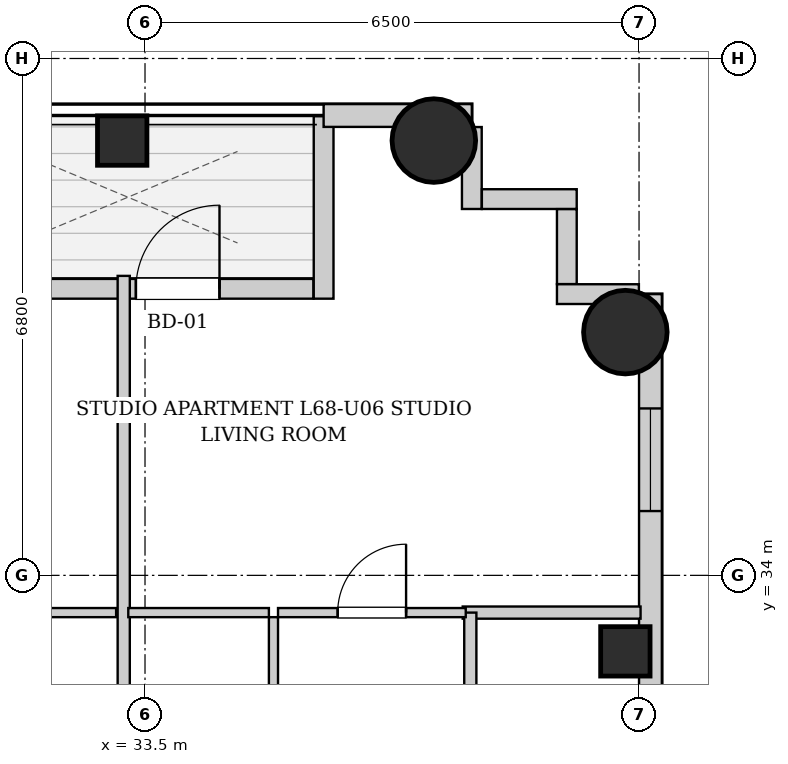
"""IFC4 building model, lengths in metres.
Left out: names, types, materials, properties, quantities, classifications, styles, units other than length and angle.
Written with IfcOpenShell. Run it as: python <this file> out.ifc"""

import sys

from ifc_helpers import new_model, si_unit, direction, frame, frame_2d, origin, origin_2d, place, context, subcontext, project, spatial, rectangle, circle, extrude, element, fill, save


model = new_model("IFC4")
c1 = context("Model", 3, precision=1e-05, world=origin(), true_north=direction((0.0, 1.0)))
c2 = subcontext(c1, "Body", "Model", "MODEL_VIEW")
j1 = project(units=[si_unit("LENGTHUNIT", "METRE"), si_unit("PLANEANGLEUNIT", "RADIAN")], contexts=[c1])
p1 = place(None, origin())
s1 = spatial("IfcSite", under=j1, at=p1, CompositionType="ELEMENT")
p2 = place(p1, origin())
s2 = spatial("IfcBuilding", under=s1, at=p2, CompositionType="ELEMENT")
p3 = place(p2, frame((0.0, 0.0, 234.3)))
s3 = spatial("IfcBuildingStorey", under=s2, at=p3, CompositionType="ELEMENT", Elevation=234.3)
p4 = place(p3, frame((33.2, 39.72, 0.0), z_axis=(0.0, 0.0, 1.0), x_axis=(1.0, 0.0, 0.0)))
e1 = element("IfcColumn", 1, at=p4, inside=s3, PredefinedType="COLUMN", context=c2, shape_type="SweptSolid", body=[
    extrude(rectangle(XDim=0.65, YDim=0.65, at=origin_2d()), origin(), (0.0, 0.0, 1.0), 3.4),
])
p5 = place(p3, frame((37.3, 39.72, 0.0), z_axis=(0.0, 0.0, 1.0), x_axis=(1.0, 0.0, 0.0)))
e2 = element("IfcColumn", 2, at=p5, inside=s3, PredefinedType="COLUMN", context=c2, shape_type="SweptSolid", body=[
    extrude(circle(Radius=0.55, at=origin_2d()), origin(), (0.0, 0.0, 1.0), 3.4),
])
p6 = place(p3, frame((39.82, 33.0, 0.0), z_axis=(0.0, 0.0, 1.0), x_axis=(1.0, 0.0, 0.0)))
e3 = element("IfcColumn", 3, at=p6, inside=s3, PredefinedType="COLUMN", context=c2, shape_type="SweptSolid", body=[
    extrude(rectangle(XDim=0.65, YDim=0.65, at=origin_2d()), origin(), (0.0, 0.0, 1.0), 3.4),
])
p7 = place(p3, frame((39.82, 37.2, 0.0), z_axis=(0.0, 0.0, 1.0), x_axis=(1.0, 0.0, 0.0)))
e4 = element("IfcColumn", 4, at=p7, inside=s3, PredefinedType="COLUMN", context=c2, shape_type="SweptSolid", body=[
    extrude(circle(Radius=0.55, at=origin_2d()), origin(), (0.0, 0.0, 1.0), 3.4),
])
p8 = place(p3, frame((30.834, 37.77, 0.0), z_axis=(0.0, 0.0, 1.0), x_axis=(1.0, 0.0, 0.0)))
e5 = element("IfcWall", 5, at=p8, inside=s3, PredefinedType="SOLIDWALL", context=c2, shape_type="SweptSolid", body=[
    extrude(rectangle(XDim=4.882, YDim=0.26, at=frame_2d((2.441, 0.0))), origin(), (0.0, 0.0, 1.0), 3.14),
])
p9 = place(p8, frame((2.546, 0.0, 0.0)))
e6 = element("IfcOpeningElement", 6, at=p9, cuts=e5, PredefinedType="OPENING", context=c2, shape_type="SweptSolid", body=[
    extrude(rectangle(XDim=1.1, YDim=2.0, at=frame_2d((0.55, 1.0))), frame((0.0, 0.14, 0.0), z_axis=(0.0, -1.0, 0.0), x_axis=(1.0, 0.0, 0.0)), (0.0, 0.0, 1.0), 0.28),
])
p10 = place(p3, frame((35.85, 37.64, 0.0), z_axis=(0.0, 0.0, 1.0), x_axis=(0.0, 1.0, 0.0)))
e7 = element("IfcWall", 7, at=p10, inside=s3, PredefinedType="SOLIDWALL", context=c2, shape_type="SweptSolid", body=[
    extrude(rectangle(XDim=2.4, YDim=0.26, at=frame_2d((1.2, 0.0))), origin(), (0.0, 0.0, 1.0), 3.14),
])
p11 = place(p3, frame((35.85, 40.05, 0.0), z_axis=(0.0, 0.0, 1.0), x_axis=(1.0, 0.0, 0.0)))
e8 = element("IfcWall", 8, at=p11, inside=s3, PredefinedType="SOLIDWALL", context=c2, shape_type="SweptSolid", body=[
    extrude(rectangle(XDim=1.95, YDim=0.3, at=frame_2d((0.975, 0.0))), origin(), (0.0, 0.0, 1.0), 3.14),
])
p12 = place(p3, frame((40.15, 37.7, 0.0), z_axis=(0.0, 0.0, 1.0), x_axis=(0.0, -1.0, 0.0)))
e9 = element("IfcWall", 9, at=p12, inside=s3, PredefinedType="SOLIDWALL", context=c2, shape_type="SweptSolid", body=[
    extrude(rectangle(XDim=31.4, YDim=0.3, at=frame_2d((15.7, 0.0))), origin(), (0.0, 0.0, 1.0), 3.14),
])
p13 = place(p12, frame((28.546, 0.0, 0.55)))
e10 = element("IfcOpeningElement", 10, at=p13, cuts=e9, PredefinedType="OPENING", context=c2, shape_type="SweptSolid", body=[
    extrude(rectangle(XDim=1.35, YDim=1.2, at=frame_2d((0.675, 0.6))), frame((0.0, 0.16, 0.0), z_axis=(0.0, -1.0, 0.0), x_axis=(1.0, 0.0, 0.0)), (0.0, 0.0, 1.0), 0.32),
])
p14 = place(p12, frame((1.504, 0.0, 0.55)))
e11 = element("IfcOpeningElement", 11, at=p14, cuts=e9, PredefinedType="OPENING", context=c2, shape_type="SweptSolid", body=[
    extrude(rectangle(XDim=1.35, YDim=1.2, at=frame_2d((0.675, 0.6))), frame((0.0, 0.16, 0.0), z_axis=(0.0, -1.0, 0.0), x_axis=(1.0, 0.0, 0.0)), (0.0, 0.0, 1.0), 0.32),
])
p15 = place(p12, frame((18.2, 0.0, 0.55)))
e12 = element("IfcOpeningElement", 12, at=p15, cuts=e9, PredefinedType="OPENING", context=c2, shape_type="SweptSolid", body=[
    extrude(rectangle(XDim=1.35, YDim=1.2, at=frame_2d((0.675, 0.6))), frame((0.0, 0.16, 0.0), z_axis=(0.0, -1.0, 0.0), x_axis=(1.0, 0.0, 0.0)), (0.0, 0.0, 1.0), 0.32),
])
p16 = place(p12, frame((19.81, 0.0, 0.55)))
e13 = element("IfcOpeningElement", 13, at=p16, cuts=e9, PredefinedType="OPENING", context=c2, shape_type="SweptSolid", body=[
    extrude(rectangle(XDim=1.35, YDim=1.2, at=frame_2d((0.675, 0.6))), frame((0.0, 0.16, 0.0), z_axis=(0.0, -1.0, 0.0), x_axis=(1.0, 0.0, 0.0)), (0.0, 0.0, 1.0), 0.32),
])
p17 = place(p12, frame((11.043, 0.0, 0.55)))
e14 = element("IfcOpeningElement", 14, at=p17, cuts=e9, PredefinedType="OPENING", context=c2, shape_type="SweptSolid", body=[
    extrude(rectangle(XDim=1.35, YDim=1.2, at=frame_2d((0.675, 0.6))), frame((0.0, 0.16, 0.0), z_axis=(0.0, -1.0, 0.0), x_axis=(1.0, 0.0, 0.0)), (0.0, 0.0, 1.0), 0.32),
])
p18 = place(p12, frame((9.185, 0.0, 0.55)))
e15 = element("IfcOpeningElement", 15, at=p18, cuts=e9, PredefinedType="OPENING", context=c2, shape_type="SweptSolid", body=[
    extrude(rectangle(XDim=1.35, YDim=1.2, at=frame_2d((0.675, 0.6))), frame((0.0, 0.16, 0.0), z_axis=(0.0, -1.0, 0.0), x_axis=(1.0, 0.0, 0.0)), (0.0, 0.0, 1.0), 0.32),
])
p19 = place(p3, frame((37.8, 39.898, 0.0), z_axis=(0.0, 0.0, 1.0), x_axis=(0.0, -1.0, 0.0)))
e16 = element("IfcWall", 16, at=p19, inside=s3, PredefinedType="SOLIDWALL", context=c2, shape_type="SweptSolid", body=[
    extrude(rectangle(XDim=1.078, YDim=0.26, at=frame_2d((0.539, 0.0))), origin(), (0.0, 0.0, 1.0), 3.14),
])
p20 = place(p3, frame((37.932, 38.95, 0.0), z_axis=(0.0, 0.0, 1.0), x_axis=(1.0, 0.0, 0.0)))
e17 = element("IfcWall", 17, at=p20, inside=s3, PredefinedType="SOLIDWALL", context=c2, shape_type="SweptSolid", body=[
    extrude(rectangle(XDim=1.248, YDim=0.26, at=frame_2d((0.624, 0.0))), origin(), (0.0, 0.0, 1.0), 3.14),
])
p21 = place(p3, frame((39.05, 38.818, 0.0), z_axis=(0.0, 0.0, 1.0), x_axis=(0.0, -1.0, 0.0)))
e18 = element("IfcWall", 18, at=p21, inside=s3, PredefinedType="SOLIDWALL", context=c2, shape_type="SweptSolid", body=[
    extrude(rectangle(XDim=0.986, YDim=0.26, at=frame_2d((0.493, 0.0))), origin(), (0.0, 0.0, 1.0), 3.14),
])
p22 = place(p3, frame((38.92, 37.7, 0.0), z_axis=(0.0, 0.0, 1.0), x_axis=(1.0, 0.0, 0.0)))
e19 = element("IfcWall", 19, at=p22, inside=s3, PredefinedType="SOLIDWALL", context=c2, shape_type="SweptSolid", body=[
    extrude(rectangle(XDim=1.078, YDim=0.26, at=frame_2d((0.539, 0.0))), origin(), (0.0, 0.0, 1.0), 3.14),
])
p23 = place(p3, frame((29.89, 33.51, 0.0), z_axis=(0.0, 0.0, 1.0), x_axis=(1.0, 0.0, 0.0)))
e20 = element("IfcWall", 20, at=p23, inside=s3, PredefinedType="PARTITIONING", context=c2, shape_type="SweptSolid", body=[
    extrude(rectangle(XDim=3.23, YDim=0.12, at=frame_2d((1.615, 0.0))), origin(), (0.0, 0.0, 1.0), 3.14),
])
p24 = place(p23, frame((1.165, 0.0, 0.0)))
e21 = element("IfcOpeningElement", 21, at=p24, cuts=e20, PredefinedType="OPENING", context=c2, shape_type="SweptSolid", body=[
    extrude(rectangle(XDim=0.9, YDim=2.05, at=frame_2d((0.45, 1.025))), frame((0.0, 0.07, 0.0), z_axis=(0.0, -1.0, 0.0), x_axis=(1.0, 0.0, 0.0)), (0.0, 0.0, 1.0), 0.14),
])
p25 = place(p3, frame((37.68, 33.51, 0.0), z_axis=(0.0, 0.0, 1.0), x_axis=(1.0, 0.0, 0.0)))
e22 = element("IfcWall", 22, at=p25, inside=s3, PredefinedType="PARTITIONING", context=c2, shape_type="SweptSolid", body=[
    extrude(rectangle(XDim=2.34, YDim=0.16, at=frame_2d((1.17, 0.0))), origin(), (0.0, 0.0, 1.0), 3.14),
])
p26 = place(p3, frame((37.78, 30.6, 0.0), z_axis=(0.0, 0.0, 1.0), x_axis=(0.0, 1.0, 0.0)))
e23 = element("IfcWall", 23, at=p26, inside=s3, PredefinedType="PARTITIONING", context=c2, shape_type="SweptSolid", body=[
    extrude(rectangle(XDim=2.91, YDim=0.16, at=frame_2d((1.455, 0.0))), origin(), (0.0, 0.0, 1.0), 3.14),
])
p27 = place(p3, frame((33.22, 30.6, 0.0), z_axis=(0.0, 0.0, 1.0), x_axis=(0.0, 1.0, 0.0)))
e24 = element("IfcWall", 24, at=p27, inside=s3, PredefinedType="PARTITIONING", context=c2, shape_type="SweptSolid", body=[
    extrude(rectangle(XDim=7.34, YDim=0.16, at=frame_2d((3.67, 0.0))), origin(), (0.0, 0.0, 1.0), 2.668),
])
p28 = place(p3, frame((35.19, 30.6, 0.0), z_axis=(0.0, 0.0, 1.0), x_axis=(0.0, 1.0, 0.0)))
e25 = element("IfcWall", 25, at=p28, inside=s3, PredefinedType="PARTITIONING", context=c2, shape_type="SweptSolid", body=[
    extrude(rectangle(XDim=2.85, YDim=0.12, at=frame_2d((1.425, 0.0))), origin(), (0.0, 0.0, 1.0), 3.14),
])
p29 = place(p28, frame((0.995, 0.0, 0.0)))
e26 = element("IfcOpeningElement", 26, at=p29, cuts=e25, PredefinedType="OPENING", context=c2, shape_type="SweptSolid", body=[
    extrude(rectangle(XDim=0.86, YDim=2.05, at=frame_2d((0.43, 1.025))), frame((0.0, 0.07, 0.0), z_axis=(0.0, -1.0, 0.0), x_axis=(1.0, 0.0, 0.0)), (0.0, 0.0, 1.0), 0.14),
])
p30 = place(p3, frame((33.28, 33.51, 0.0), z_axis=(0.0, 0.0, 1.0), x_axis=(1.0, 0.0, 0.0)))
e27 = element("IfcWall", 27, at=p30, inside=s3, PredefinedType="PARTITIONING", context=c2, shape_type="SweptSolid", body=[
    extrude(rectangle(XDim=1.85, YDim=0.12, at=frame_2d((0.925, 0.0))), origin(), (0.0, 0.0, 1.0), 3.14),
])
p31 = place(p3, frame((35.25, 33.51, 0.0), z_axis=(0.0, 0.0, 1.0), x_axis=(1.0, 0.0, 0.0)))
e28 = element("IfcWall", 28, at=p31, inside=s3, PredefinedType="PARTITIONING", context=c2, shape_type="SweptSolid", body=[
    extrude(rectangle(XDim=2.47, YDim=0.12, at=frame_2d((1.235, 0.0))), origin(), (0.0, 0.0, 1.0), 3.14),
])
p32 = place(p31, frame((0.785, 0.0, 0.0)))
e29 = element("IfcOpeningElement", 29, at=p32, cuts=e28, PredefinedType="OPENING", context=c2, shape_type="SweptSolid", body=[
    extrude(rectangle(XDim=0.9, YDim=2.05, at=frame_2d((0.45, 1.025))), frame((0.0, 0.07, 0.0), z_axis=(0.0, -1.0, 0.0), x_axis=(1.0, 0.0, 0.0)), (0.0, 0.0, 1.0), 0.14),
])
p33 = place(p32, origin())
e30 = element("IfcDoor", 30, at=p33, inside=s3, OperationType="SINGLE_SWING_RIGHT", PredefinedType="DOOR", context=c2, shape_type="SweptSolid", body=[
    extrude(rectangle(XDim=0.9, YDim=2.05, at=frame_2d((0.45, 1.025))), frame((0.0, 0.025, 0.0), z_axis=(0.0, -1.0, 0.0), x_axis=(1.0, 0.0, 0.0)), (0.0, 0.0, 1.0), 0.05),
])
fill(e29, e30)
p34 = place(p9, origin())
e31 = element("IfcDoor", 31, at=p34, inside=s3, OperationType="SINGLE_SWING_RIGHT", PredefinedType="DOOR", context=c2, shape_type="SweptSolid", body=[
    extrude(rectangle(XDim=1.1, YDim=2.0, at=frame_2d((0.55, 1.0))), frame((0.0, 0.025, 0.0), z_axis=(0.0, -1.0, 0.0), x_axis=(1.0, 0.0, 0.0)), (0.0, 0.0, 1.0), 0.05),
])
fill(e6, e31)
p35 = place(p14, origin())
e32 = element("IfcWindow", 32, at=p35, inside=s3, PartitioningType="SINGLE_PANEL", PredefinedType="WINDOW", context=c2, shape_type="SweptSolid", body=[
    extrude(rectangle(XDim=1.35, YDim=1.2, at=frame_2d((0.675, 0.6))), frame((0.0, 0.03, 0.0), z_axis=(0.0, -1.0, 0.0), x_axis=(1.0, 0.0, 0.0)), (0.0, 0.0, 1.0), 0.06),
])
fill(e11, e32)
save(model, sys.argv[1])
